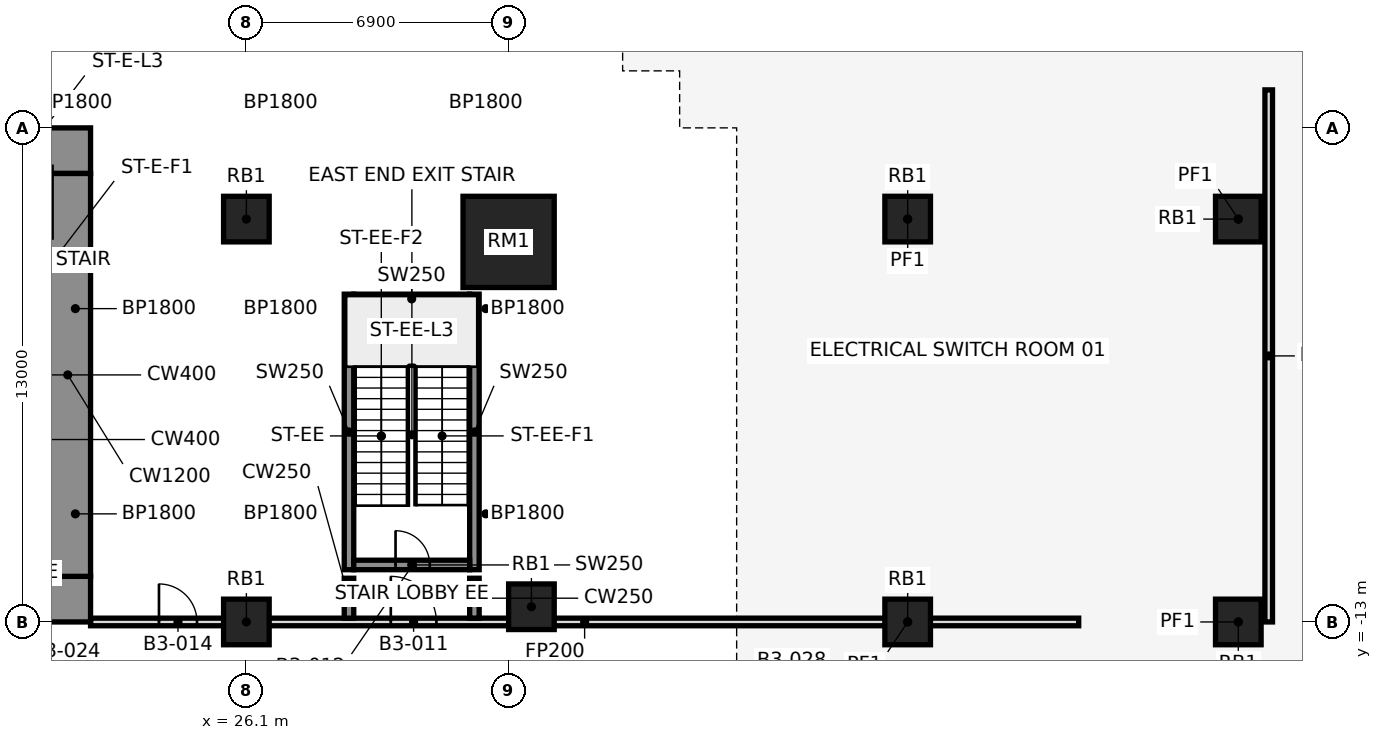
"""IFC4 building model, lengths in metres.
Left out: names, types, materials, properties, quantities, classifications, styles, units other than length and angle.
Written with IfcOpenShell. Run it as: python <this file> out.ifc"""

import sys

from ifc_helpers import new_model, si_unit, direction, frame, frame_2d, origin, origin_2d, place, context, subcontext, project, spatial, rectangle, extrude, element, fill, save


model = new_model("IFC4")
c1 = context("Model", 3, precision=1e-05, world=origin(), true_north=direction((0.0, 1.0)))
c2 = subcontext(c1, "Body", "Model", "MODEL_VIEW")
j1 = project(units=[si_unit("LENGTHUNIT", "METRE"), si_unit("PLANEANGLEUNIT", "RADIAN")], contexts=[c1])
p1 = place(None, origin())
s1 = spatial("IfcSite", under=j1, at=p1, CompositionType="ELEMENT")
p2 = place(p1, origin())
s2 = spatial("IfcBuilding", under=s1, at=p2, CompositionType="ELEMENT")
p3 = place(p2, frame((0.0, 0.0, -15.0)))
s3 = spatial("IfcBuildingStorey", under=s2, at=p3, CompositionType="ELEMENT", Elevation=-15.0)
p4 = place(p3, frame((26.1, -2.4, 0.0), z_axis=(0.0, 0.0, 1.0), x_axis=(1.0, 0.0, 0.0)))
e1 = element("IfcColumn", 1, at=p4, inside=s3, PredefinedType="COLUMN", context=c2, shape_type="SweptSolid", body=[
    extrude(rectangle(XDim=1.2, YDim=1.2, at=origin_2d()), origin(), (0.0, 0.0, 1.0), 5.0),
])
p5 = place(p3, frame((33.0, -3.0, 0.0), z_axis=(0.0, 0.0, 1.0), x_axis=(1.0, 0.0, 0.0)))
e2 = element("IfcColumn", 2, at=p5, inside=s3, PredefinedType="COLUMN", context=c2, shape_type="SweptSolid", body=[
    extrude(rectangle(XDim=2.4, YDim=2.4, at=origin_2d()), origin(), (0.0, 0.0, 1.0), 5.0),
])
for number, where, z_axis, x_axis in (
    (3, (33.6, -12.6, 0.0), (0.0, 0.0, 1.0), (1.0, 0.0, 0.0)),
    (4, (26.1, -13.0, 0.0), (0.0, 0.0, 1.0), (1.0, 0.0, 0.0)),
):
    element("IfcColumn", number, at=place(p3, frame(where, z_axis=z_axis, x_axis=x_axis)), inside=s3, PredefinedType="COLUMN", context=c2, shape_type="SweptSolid", body=[
        extrude(rectangle(XDim=1.2, YDim=1.2, at=origin_2d()), origin(), (0.0, 0.0, 1.0), 5.0),
    ])
for number, where, z_axis, x_axis in (
    (5, (43.5, -2.4, -0.3), (0.0, 0.0, 1.0), (1.0, 0.0, 0.0)),
    (6, (43.5, -13.0, -0.3), (0.0, 0.0, 1.0), (1.0, 0.0, 0.0)),
    (7, (52.2, -2.4, -0.3), (0.0, 0.0, 1.0), (1.0, 0.0, 0.0)),
    (8, (52.2, -13.0, -0.3), (0.0, 0.0, 1.0), (1.0, 0.0, 0.0)),
):
    element("IfcColumn", number, at=place(p3, frame(where, z_axis=z_axis, x_axis=x_axis)), inside=s3, PredefinedType="COLUMN", context=c2, shape_type="SweptSolid", body=[
        extrude(rectangle(XDim=1.2, YDim=1.2, at=origin_2d()), origin(), (0.0, 0.0, 1.0), 5.3),
    ])
for number, where, z_axis, x_axis in (
    (9, (28.8, -11.625, 0.0), (0.0, 0.0, 1.0), (0.0, 1.0, 0.0)),
    (10, (32.1, -11.625, 0.0), (0.0, 0.0, 1.0), (0.0, 1.0, 0.0)),
):
    element("IfcWall", number, at=place(p3, frame(where, z_axis=z_axis, x_axis=x_axis)), inside=s3, PredefinedType="SHEAR", context=c2, shape_type="SweptSolid", body=[
        extrude(rectangle(XDim=7.25, YDim=0.25, at=frame_2d((3.625, 0.0))), origin(), (0.0, 0.0, 1.0), 5.0),
    ])
p6 = place(p3, frame((28.925, -11.5, 0.0), z_axis=(0.0, 0.0, 1.0), x_axis=(1.0, 0.0, 0.0)))
e11 = element("IfcWall", 11, at=p6, inside=s3, PredefinedType="SHEAR", context=c2, shape_type="SweptSolid", body=[
    extrude(rectangle(XDim=3.05, YDim=0.25, at=frame_2d((1.525, 0.0))), origin(), (0.0, 0.0, 1.0), 5.0),
])
p7 = place(p6, frame((1.1, 0.0, 0.0)))
e12 = element("IfcOpeningElement", 12, at=p7, cuts=e11, PredefinedType="OPENING", context=c2, shape_type="SweptSolid", body=[
    extrude(rectangle(XDim=0.9, YDim=2.1, at=frame_2d((0.45, 1.05))), frame((0.0, 0.137, 0.0), z_axis=(0.0, -1.0, 0.0), x_axis=(1.0, 0.0, 0.0)), (0.0, 0.0, 1.0), 0.274),
])
p8 = place(p3, frame((28.925, -4.5, 0.0), z_axis=(0.0, 0.0, 1.0), x_axis=(1.0, 0.0, 0.0)))
e13 = element("IfcWall", 13, at=p8, inside=s3, PredefinedType="SHEAR", context=c2, shape_type="SweptSolid", body=[
    extrude(rectangle(XDim=3.05, YDim=0.25, at=frame_2d((1.525, 0.0))), origin(), (0.0, 0.0, 1.0), 5.0),
])
p9 = place(p3, frame((22.0, -13.0, 0.0), z_axis=(0.0, 0.0, 1.0), x_axis=(1.0, 0.0, 0.0)))
e14 = element("IfcWall", 14, at=p9, inside=s3, PredefinedType="PARTITIONING", context=c2, shape_type="SweptSolid", body=[
    extrude(rectangle(XDim=26.0, YDim=0.2, at=frame_2d((13.0, 0.0))), origin(), (0.0, 0.0, 1.0), 4.7),
])
p10 = place(p9, frame((7.9, 0.0, 0.0)))
e15 = element("IfcOpeningElement", 15, at=p10, cuts=e14, PredefinedType="OPENING", context=c2, shape_type="SweptSolid", body=[
    extrude(rectangle(XDim=1.2, YDim=2.1, at=frame_2d((0.6, 1.05))), frame((0.0, 0.112, 0.0), z_axis=(0.0, -1.0, 0.0), x_axis=(1.0, 0.0, 0.0)), (0.0, 0.0, 1.0), 0.224),
])
p11 = place(p9, frame((1.8, 0.0, 0.0)))
e16 = element("IfcOpeningElement", 16, at=p11, cuts=e14, PredefinedType="OPENING", context=c2, shape_type="SweptSolid", body=[
    extrude(rectangle(XDim=1.0, YDim=2.1, at=frame_2d((0.5, 1.05))), frame((0.0, 0.112, 0.0), z_axis=(0.0, -1.0, 0.0), x_axis=(1.0, 0.0, 0.0)), (0.0, 0.0, 1.0), 0.224),
])
for number, where, z_axis, x_axis in (
    (17, (28.8, -12.9, 0.0), (0.0, 0.0, 1.0), (0.0, 1.0, 0.0)),
    (18, (32.1, -12.9, 0.0), (0.0, 0.0, 1.0), (0.0, 1.0, 0.0)),
):
    element("IfcWall", number, at=place(p3, frame(where, z_axis=z_axis, x_axis=x_axis)), inside=s3, PredefinedType="SHEAR", context=c2, shape_type="SweptSolid", body=[
        extrude(rectangle(XDim=1.05, YDim=0.25, at=frame_2d((0.525, 0.0))), origin(), (0.0, 0.0, 1.0), 5.0),
    ])
p12 = place(p3, frame((53.0, -13.0, 0.0), z_axis=(0.0, 0.0, 1.0), x_axis=(0.0, 1.0, 0.0)))
e19 = element("IfcWall", 19, at=p12, inside=s3, PredefinedType="PARTITIONING", context=c2, shape_type="SweptSolid", body=[
    extrude(rectangle(XDim=14.0, YDim=0.2, at=frame_2d((7.0, 0.0))), origin(), (0.0, 0.0, 1.0), 4.7),
])
p13 = place(p3, frame((-22.0, -0.6, 0.0), z_axis=(0.0, 0.0, 1.0), x_axis=(1.0, 0.0, 0.0)))
e20 = element("IfcWall", 20, at=p13, inside=s3, PredefinedType="SHEAR", context=c2, shape_type="SweptSolid", body=[
    extrude(rectangle(XDim=44.0, YDim=1.2, at=frame_2d((22.0, 0.0))), origin(), (0.0, 0.0, 1.0), 5.0),
])
p14 = place(p3, frame((-22.0, -12.4, 0.0), z_axis=(0.0, 0.0, 1.0), x_axis=(1.0, 0.0, 0.0)))
e21 = element("IfcWall", 21, at=p14, inside=s3, PredefinedType="SHEAR", context=c2, shape_type="SweptSolid", body=[
    extrude(rectangle(XDim=44.0, YDim=1.2, at=frame_2d((22.0, 0.0))), origin(), (0.0, 0.0, 1.0), 5.0),
])
p15 = place(p14, frame((2.2, 0.0, 0.0)))
e22 = element("IfcOpeningElement", 22, at=p15, cuts=e21, PredefinedType="OPENING", context=c2, shape_type="SweptSolid", body=[
    extrude(rectangle(XDim=1.2, YDim=2.1, at=frame_2d((0.6, 1.05))), frame((0.0, 0.612, 0.0), z_axis=(0.0, -1.0, 0.0), x_axis=(1.0, 0.0, 0.0)), (0.0, 0.0, 1.0), 1.224),
])
p16 = place(p14, frame((21.4, 0.0, 0.0)))
e23 = element("IfcOpeningElement", 23, at=p16, cuts=e21, PredefinedType="OPENING", context=c2, shape_type="SweptSolid", body=[
    extrude(rectangle(XDim=1.2, YDim=2.1, at=frame_2d((0.6, 1.05))), frame((0.0, 0.612, 0.0), z_axis=(0.0, -1.0, 0.0), x_axis=(1.0, 0.0, 0.0)), (0.0, 0.0, 1.0), 1.224),
])
p17 = place(p14, frame((40.6, 0.0, 0.0)))
e24 = element("IfcOpeningElement", 24, at=p17, cuts=e21, PredefinedType="OPENING", context=c2, shape_type="SweptSolid", body=[
    extrude(rectangle(XDim=1.2, YDim=2.1, at=frame_2d((0.6, 1.05))), frame((0.0, 0.612, 0.0), z_axis=(0.0, -1.0, 0.0), x_axis=(1.0, 0.0, 0.0)), (0.0, 0.0, 1.0), 1.224),
])
p18 = place(p14, frame((16.0, 0.0, 0.0)))
e25 = element("IfcOpeningElement", 25, at=p18, cuts=e21, PredefinedType="OPENING", context=c2, shape_type="SweptSolid", body=[
    extrude(rectangle(XDim=1.8, YDim=2.1, at=frame_2d((0.9, 1.05))), frame((0.0, 0.612, 0.0), z_axis=(0.0, -1.0, 0.0), x_axis=(1.0, 0.0, 0.0)), (0.0, 0.0, 1.0), 1.224),
])
p19 = place(p14, frame((6.3, 0.0, 0.0)))
e26 = element("IfcOpeningElement", 26, at=p19, cuts=e21, PredefinedType="OPENING", context=c2, shape_type="SweptSolid", body=[
    extrude(rectangle(XDim=1.2, YDim=2.1, at=frame_2d((0.6, 1.05))), frame((0.0, 0.612, 0.0), z_axis=(0.0, -1.0, 0.0), x_axis=(1.0, 0.0, 0.0)), (0.0, 0.0, 1.0), 1.224),
])
p20 = place(p14, frame((26.2, 0.0, 0.0)))
e27 = element("IfcOpeningElement", 27, at=p20, cuts=e21, PredefinedType="OPENING", context=c2, shape_type="SweptSolid", body=[
    extrude(rectangle(XDim=1.8, YDim=2.1, at=frame_2d((0.9, 1.05))), frame((0.0, 0.612, 0.0), z_axis=(0.0, -1.0, 0.0), x_axis=(1.0, 0.0, 0.0)), (0.0, 0.0, 1.0), 1.224),
])
p21 = place(p14, frame((36.5, 0.0, 0.0)))
e28 = element("IfcOpeningElement", 28, at=p21, cuts=e21, PredefinedType="OPENING", context=c2, shape_type="SweptSolid", body=[
    extrude(rectangle(XDim=1.2, YDim=2.1, at=frame_2d((0.6, 1.05))), frame((0.0, 0.612, 0.0), z_axis=(0.0, -1.0, 0.0), x_axis=(1.0, 0.0, 0.0)), (0.0, 0.0, 1.0), 1.224),
])
p22 = place(p3, frame((21.4, -11.8, 0.0), z_axis=(0.0, 0.0, 1.0), x_axis=(0.0, 1.0, 0.0)))
e29 = element("IfcWall", 29, at=p22, inside=s3, PredefinedType="SHEAR", context=c2, shape_type="SweptSolid", body=[
    extrude(rectangle(XDim=10.6, YDim=1.2, at=frame_2d((5.3, 0.0))), origin(), (0.0, 0.0, 1.0), 5.0),
])
p23 = place(p10, origin())
e30 = element("IfcDoor", 30, at=p23, inside=s3, OperationType="SINGLE_SWING_LEFT", PredefinedType="DOOR", context=c2, shape_type="SweptSolid", body=[
    extrude(rectangle(XDim=1.2, YDim=2.1, at=frame_2d((0.6, 1.05))), frame((0.0, 0.025, 0.0), z_axis=(0.0, -1.0, 0.0), x_axis=(1.0, 0.0, 0.0)), (0.0, 0.0, 1.0), 0.05),
])
fill(e15, e30)
p24 = place(p7, origin())
e31 = element("IfcDoor", 31, at=p24, inside=s3, OperationType="SINGLE_SWING_RIGHT", PredefinedType="DOOR", context=c2, shape_type="SweptSolid", body=[
    extrude(rectangle(XDim=0.9, YDim=2.1, at=frame_2d((0.45, 1.05))), frame((0.0, 0.025, 0.0), z_axis=(0.0, -1.0, 0.0), x_axis=(1.0, 0.0, 0.0)), (0.0, 0.0, 1.0), 0.05),
])
fill(e12, e31)
p25 = place(p11, origin())
e32 = element("IfcDoor", 32, at=p25, inside=s3, OperationType="SINGLE_SWING_LEFT", PredefinedType="DOOR", context=c2, shape_type="SweptSolid", body=[
    extrude(rectangle(XDim=1.0, YDim=2.1, at=frame_2d((0.5, 1.05))), frame((0.0, 0.025, 0.0), z_axis=(0.0, -1.0, 0.0), x_axis=(1.0, 0.0, 0.0)), (0.0, 0.0, 1.0), 0.05),
])
fill(e16, e32)
save(model, sys.argv[1])
